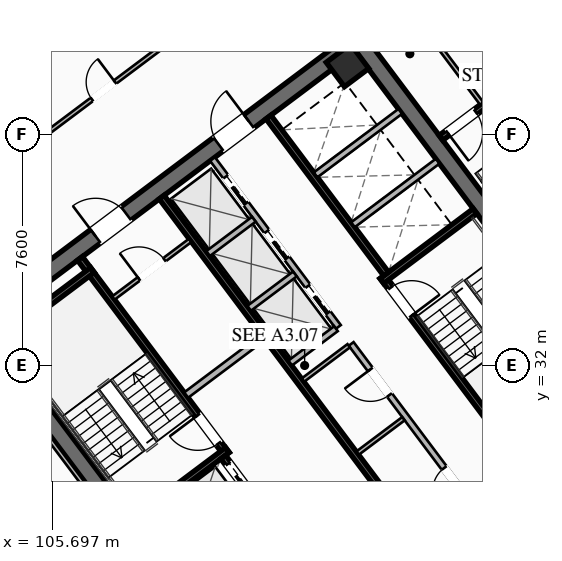
"""IFC4 building model, lengths in metres.
Left out: names, types, materials, properties, quantities, classifications, styles, units other than length and angle.
Written with IfcOpenShell. Run it as: python <this file> out.ifc"""

import sys

from ifc_helpers import new_model, si_unit, direction, frame, frame_2d, origin, origin_2d, place, context, subcontext, project, spatial, rectangle, hollow_rectangle, extrude, element, fill, save


model = new_model("IFC4")
c1 = context("Model", 3, precision=1e-05, world=origin(), true_north=direction((0.0, 1.0)))
c2 = subcontext(c1, "Body", "Model", "MODEL_VIEW")
j1 = project(units=[si_unit("LENGTHUNIT", "METRE"), si_unit("PLANEANGLEUNIT", "RADIAN")], contexts=[c1])
p1 = place(None, origin())
s1 = spatial("IfcSite", under=j1, at=p1, CompositionType="ELEMENT")
p2 = place(p1, origin())
s2 = spatial("IfcBuilding", under=s1, at=p2, CompositionType="ELEMENT")
p3 = place(p2, frame((0.0, 0.0, 164.1)))
s3 = spatial("IfcBuildingStorey", under=s2, at=p3, CompositionType="ELEMENT", Elevation=164.1)
for number, where, z_axis, x_axis in (
    (1, (112.436, 21.077, 0.0), (0.0, 0.0, 1.0), (-0.6, 0.8, 0.0)),
    (2, (115.564, 42.923, 0.0), (0.0, 0.0, 1.0), (0.6, -0.8, 0.0)),
):
    element("IfcWall", number, at=place(p3, frame(where, z_axis=z_axis, x_axis=x_axis)), inside=s3, PredefinedType="SHEAR", context=c2, shape_type="SweptSolid", body=[
        extrude(rectangle(XDim=15.6, YDim=0.55, at=frame_2d((7.8, 0.0))), origin(), (0.0, 0.0, 1.0), 3.55),
    ])
p4 = place(p3, frame((124.539, 30.498, 0.0), z_axis=(0.0, 0.0, 1.0), x_axis=(-0.799998054672, -0.600002593761, 0.0)))
e3 = element("IfcWall", 3, at=p4, inside=s3, PredefinedType="SHEAR", context=c2, shape_type="SweptSolid", body=[
    extrude(rectangle(XDim=15.06, YDim=0.55, at=frame_2d((7.53, 0.0))), origin(), (0.0, 0.0, 1.0), 3.55),
])
p5 = place(p4, frame((9.23, 0.0, 0.0)))
e4 = element("IfcOpeningElement", 4, at=p5, cuts=e3, PredefinedType="OPENING", context=c2, shape_type="SweptSolid", body=[
    extrude(rectangle(XDim=1.25, YDim=2.25, at=frame_2d((0.625, 1.125))), frame((0.0, 0.285, 0.0), z_axis=(0.0, -1.0, 0.0), x_axis=(1.0, 0.0, 0.0)), (0.0, 0.0, 1.0), 0.57),
])
p6 = place(p4, frame((4.18, 0.0, 0.0)))
e5 = element("IfcOpeningElement", 5, at=p6, cuts=e3, PredefinedType="OPENING", context=c2, shape_type="SweptSolid", body=[
    extrude(rectangle(XDim=1.25, YDim=2.25, at=frame_2d((0.625, 1.125))), frame((0.0, 0.285, 0.0), z_axis=(0.0, -1.0, 0.0), x_axis=(1.0, 0.0, 0.0)), (0.0, 0.0, 1.0), 0.57),
])
p7 = place(p3, frame((103.461, 33.502, 0.0), z_axis=(0.0, 0.0, 1.0), x_axis=(0.799998054672, 0.600002593761, 0.0)))
e6 = element("IfcWall", 6, at=p7, inside=s3, PredefinedType="SHEAR", context=c2, shape_type="SweptSolid", body=[
    extrude(rectangle(XDim=15.06, YDim=0.55, at=frame_2d((7.53, 0.0))), origin(), (0.0, 0.0, 1.0), 3.55),
])
p8 = place(p7, frame((4.58, 0.0, 0.0)))
e7 = element("IfcOpeningElement", 7, at=p8, cuts=e6, PredefinedType="OPENING", context=c2, shape_type="SweptSolid", body=[
    extrude(rectangle(XDim=1.25, YDim=2.25, at=frame_2d((0.625, 1.125))), frame((0.0, 0.285, 0.0), z_axis=(0.0, -1.0, 0.0), x_axis=(1.0, 0.0, 0.0)), (0.0, 0.0, 1.0), 0.57),
])
p9 = place(p7, frame((9.63, 0.0, 0.0)))
e8 = element("IfcOpeningElement", 8, at=p9, cuts=e6, PredefinedType="OPENING", context=c2, shape_type="SweptSolid", body=[
    extrude(rectangle(XDim=1.25, YDim=2.25, at=frame_2d((0.625, 1.125))), frame((0.0, 0.285, 0.0), z_axis=(0.0, -1.0, 0.0), x_axis=(1.0, 0.0, 0.0)), (0.0, 0.0, 1.0), 0.57),
])
p10 = place(p3, frame((115.41, 41.87, 0.0), z_axis=(0.0, 0.0, 1.0), x_axis=(0.799999996291, 0.600000004945, 0.0)))
e9 = element("IfcColumn", 9, at=p10, inside=s3, PredefinedType="COLUMN", context=c2, shape_type="SweptSolid", body=[
    extrude(hollow_rectangle(XDim=1.0, YDim=1.0, WallThickness=0.04, at=origin_2d()), origin(), (0.0, 0.0, 1.0), 3.37),
])
p11 = place(p3, frame((111.44, 29.08, 0.0), z_axis=(0.0, 0.0, 1.0), x_axis=(-0.59999029481, 0.8000072788, 0.0)))
e10 = element("IfcWall", 10, at=p11, inside=s3, PredefinedType="SHEAR", context=c2, shape_type="SweptSolid", body=[
    extrude(rectangle(XDim=8.05, YDim=0.2, at=frame_2d((4.025, 0.0))), origin(), (0.0, 0.0, 1.0), 3.37),
])
p12 = place(p11, frame((0.45, 0.0, 0.0)))
e11 = element("IfcOpeningElement", 11, at=p12, cuts=e10, PredefinedType="OPENING", context=c2, shape_type="SweptSolid", body=[
    extrude(rectangle(XDim=1.15, YDim=2.2, at=frame_2d((0.575, 1.1))), frame((0.0, 0.11, 0.0), z_axis=(0.0, -1.0, 0.0), x_axis=(1.0, 0.0, 0.0)), (0.0, 0.0, 1.0), 0.22),
])
for number, where, z_axis, x_axis in (
    (12, (108.396, 26.922, 0.0), (0.0, 0.0, 1.0), (0.8, 0.6, 0.0)),
    (13, (103.956, 32.842, 0.0), (0.0, 0.0, 1.0), (0.8, 0.6, 0.0)),
):
    element("IfcWall", number, at=place(p3, frame(where, z_axis=z_axis, x_axis=x_axis)), inside=s3, PredefinedType="SHEAR", context=c2, shape_type="SweptSolid", body=[
        extrude(rectangle(XDim=3.83, YDim=0.2, at=frame_2d((1.915, 0.0))), origin(), (0.0, 0.0, 1.0), 3.37),
    ])
p13 = place(p3, frame((116.56, 34.92, 0.0), z_axis=(0.0, 0.0, 1.0), x_axis=(0.59999029481, -0.8000072788, 0.0)))
e14 = element("IfcWall", 14, at=p13, inside=s3, PredefinedType="SHEAR", context=c2, shape_type="SweptSolid", body=[
    extrude(rectangle(XDim=8.05, YDim=0.2, at=frame_2d((4.025, 0.0))), origin(), (0.0, 0.0, 1.0), 3.37),
])
p14 = place(p13, frame((0.45, 0.0, 0.0)))
e15 = element("IfcOpeningElement", 15, at=p14, cuts=e14, PredefinedType="OPENING", context=c2, shape_type="SweptSolid", body=[
    extrude(rectangle(XDim=1.15, YDim=2.2, at=frame_2d((0.575, 1.1))), frame((0.0, 0.11, 0.0), z_axis=(0.0, -1.0, 0.0), x_axis=(1.0, 0.0, 0.0)), (0.0, 0.0, 1.0), 0.22),
])
p15 = place(p3, frame((116.54, 34.78, 0.0), z_axis=(0.0, 0.0, 1.0), x_axis=(0.800015298837, 0.599979601008, 0.0)))
e16 = element("IfcWall", 16, at=p15, inside=s3, PredefinedType="SHEAR", context=c2, shape_type="SweptSolid", body=[
    extrude(rectangle(XDim=3.83, YDim=0.2, at=frame_2d((1.915, 0.0))), origin(), (0.0, 0.0, 1.0), 3.37),
])
p16 = place(p3, frame((117.998, 25.936, 0.0), z_axis=(0.0, 0.0, 1.0), x_axis=(-0.600002693989, 0.799997979501, 0.0)))
e17 = element("IfcWall", 17, at=p16, inside=s3, PredefinedType="SHEAR", context=c2, shape_type="SweptSolid", body=[
    extrude(rectangle(XDim=14.5, YDim=0.2, at=frame_2d((7.25, 0.0))), origin(), (0.0, 0.0, 1.0), 3.37),
])
p17 = place(p3, frame((110.104, 31.028, 0.0), z_axis=(0.0, 0.0, 1.0), x_axis=(0.800018601094, 0.59997519774, 0.0)))
e18 = element("IfcWall", 18, at=p17, inside=s3, PredefinedType="SOLIDWALL", context=c2, shape_type="SweptSolid", body=[
    extrude(rectangle(XDim=3.15, YDim=0.22, at=frame_2d((1.575, 0.0))), origin(), (0.0, 0.0, 1.0), 2.723),
])
p18 = place(p3, frame((115.19, 23.83, 0.0), z_axis=(0.0, 0.0, 1.0), x_axis=(-0.599993943644, 0.800004542231, 0.0)))
e19 = element("IfcWall", 19, at=p18, inside=s3, PredefinedType="SHEAR", context=c2, shape_type="SweptSolid", body=[
    extrude(rectangle(XDim=6.45, YDim=0.2, at=frame_2d((3.225, 0.0))), origin(), (0.0, 0.0, 1.0), 3.37),
])
p19 = place(p18, frame((4.875, 0.0, 0.0)))
e20 = element("IfcOpeningElement", 20, at=p19, cuts=e19, PredefinedType="OPENING", context=c2, shape_type="SweptSolid", body=[
    extrude(rectangle(XDim=1.3, YDim=2.25, at=frame_2d((0.65, 1.125))), frame((0.0, 0.11, 0.0), z_axis=(0.0, -1.0, 0.0), x_axis=(1.0, 0.0, 0.0)), (0.0, 0.0, 1.0), 0.22),
])
p20 = place(p18, frame((2.875, 0.0, 0.0)))
e21 = element("IfcOpeningElement", 21, at=p20, cuts=e19, PredefinedType="OPENING", context=c2, shape_type="SweptSolid", body=[
    extrude(rectangle(XDim=1.3, YDim=2.25, at=frame_2d((0.65, 1.125))), frame((0.0, 0.11, 0.0), z_axis=(0.0, -1.0, 0.0), x_axis=(1.0, 0.0, 0.0)), (0.0, 0.0, 1.0), 0.22),
])
p21 = place(p18, frame((0.675, 0.0, 0.0)))
e22 = element("IfcOpeningElement", 22, at=p21, cuts=e19, PredefinedType="OPENING", context=c2, shape_type="SweptSolid", body=[
    extrude(rectangle(XDim=1.3, YDim=2.25, at=frame_2d((0.65, 1.125))), frame((0.0, 0.11, 0.0), z_axis=(0.0, -1.0, 0.0), x_axis=(1.0, 0.0, 0.0)), (0.0, 0.0, 1.0), 0.22),
])
p22 = place(p3, frame((112.81, 40.17, 0.0), z_axis=(0.0, 0.0, 1.0), x_axis=(0.599993943644, -0.800004542231, 0.0)))
e23 = element("IfcWall", 23, at=p22, inside=s3, PredefinedType="SHEAR", context=c2, shape_type="SweptSolid", body=[
    extrude(rectangle(XDim=6.45, YDim=0.2, at=frame_2d((3.225, 0.0))), origin(), (0.0, 0.0, 1.0), 3.37),
])
for number, where, z_axis, x_axis in (
    (24, (115.59, 36.63, 0.0), (0.0, 0.0, 1.0), (0.8, 0.6, 0.0)),
    (25, (114.36, 38.27, 0.0), (0.0, 0.0, 1.0), (0.8, 0.6, 0.0)),
):
    element("IfcWall", number, at=place(p3, frame(where, z_axis=z_axis, x_axis=x_axis)), inside=s3, PredefinedType="SOLIDWALL", context=c2, shape_type="SweptSolid", body=[
        extrude(rectangle(XDim=3.48, YDim=0.2, at=frame_2d((1.74, 0.0))), origin(), (0.0, 0.0, 1.0), 3.37),
    ])
p23 = place(p3, frame((107.71, 34.22, 0.0), z_axis=(0.0, 0.0, 1.0), x_axis=(0.799981399002, 0.60002480053, 0.0)))
e26 = element("IfcWall", 26, at=p23, inside=s3, PredefinedType="PARTITIONING", context=c2, shape_type="SweptSolid", body=[
    extrude(rectangle(XDim=3.15, YDim=0.135, at=frame_2d((1.575, 0.0))), origin(), (0.0, 0.0, 1.0), 2.723),
])
p24 = place(p23, frame((1.05, 0.0, 0.0)))
e27 = element("IfcOpeningElement", 27, at=p24, cuts=e26, PredefinedType="OPENING", context=c2, shape_type="SweptSolid", body=[
    extrude(rectangle(XDim=1.05, YDim=2.2, at=frame_2d((0.525, 1.1))), frame((0.0, 0.077, 0.0), z_axis=(0.0, -1.0, 0.0), x_axis=(1.0, 0.0, 0.0)), (0.0, 0.0, 1.0), 0.155),
])
p25 = place(p3, frame((119.67, 27.19, 0.0), z_axis=(0.0, 0.0, 1.0), x_axis=(-0.599988677396, 0.800008491828, 0.0)))
e28 = element("IfcWall", 28, at=p25, inside=s3, PredefinedType="SOLIDWALL", context=c2, shape_type="SweptSolid", body=[
    extrude(rectangle(XDim=6.9, YDim=0.2, at=frame_2d((3.45, 0.0))), origin(), (0.0, 0.0, 1.0), 2.723),
])
p26 = place(p25, frame((0.85, 0.0, 0.0)))
e29 = element("IfcOpeningElement", 29, at=p26, cuts=e28, PredefinedType="OPENING", context=c2, shape_type="SweptSolid", body=[
    extrude(rectangle(XDim=0.95, YDim=2.05, at=frame_2d((0.475, 1.025))), frame((0.0, 0.11, 0.0), z_axis=(0.0, -1.0, 0.0), x_axis=(1.0, 0.0, 0.0)), (0.0, 0.0, 1.0), 0.22),
])
p27 = place(p25, frame((4.8, 0.0, 0.0)))
e30 = element("IfcOpeningElement", 30, at=p27, cuts=e28, PredefinedType="OPENING", context=c2, shape_type="SweptSolid", body=[
    extrude(rectangle(XDim=1.05, YDim=2.2, at=frame_2d((0.525, 1.1))), frame((0.0, 0.11, 0.0), z_axis=(0.0, -1.0, 0.0), x_axis=(1.0, 0.0, 0.0)), (0.0, 0.0, 1.0), 0.22),
])
for number, where, z_axis, x_axis in (
    (31, (113.946, 31.522, 0.0), (0.0, 0.0, 1.0), (0.8, 0.6, 0.0)),
    (32, (115.746, 29.122, 0.0), (0.0, 0.0, 1.0), (0.8, 0.6, 0.0)),
):
    element("IfcWall", number, at=place(p3, frame(where, z_axis=z_axis, x_axis=x_axis)), inside=s3, PredefinedType="PARTITIONING", context=c2, shape_type="SweptSolid", body=[
        extrude(rectangle(XDim=1.88, YDim=0.135, at=frame_2d((0.94, 0.0))), origin(), (0.0, 0.0, 1.0), 2.723),
    ])
p28 = place(p3, frame((115.11, 33.27, 0.0), z_axis=(0.0, 0.0, 1.0), x_axis=(-0.600011322243, 0.799991508192, 0.0)))
e33 = element("IfcWall", 33, at=p28, inside=s3, PredefinedType="SOLIDWALL", context=c2, shape_type="SweptSolid", body=[
    extrude(rectangle(XDim=6.9, YDim=0.2, at=frame_2d((3.45, 0.0))), origin(), (0.0, 0.0, 1.0), 3.37),
])
p29 = place(p28, frame((0.575, 0.0, 0.0)))
e34 = element("IfcOpeningElement", 34, at=p29, cuts=e33, PredefinedType="OPENING", context=c2, shape_type="SweptSolid", body=[
    extrude(rectangle(XDim=1.1, YDim=2.2, at=frame_2d((0.55, 1.1))), frame((0.0, 0.11, 0.0), z_axis=(0.0, -1.0, 0.0), x_axis=(1.0, 0.0, 0.0)), (0.0, 0.0, 1.0), 0.22),
])
p30 = place(p28, frame((2.825, 0.0, 0.0)))
e35 = element("IfcOpeningElement", 35, at=p30, cuts=e33, PredefinedType="OPENING", context=c2, shape_type="SweptSolid", body=[
    extrude(rectangle(XDim=1.1, YDim=2.2, at=frame_2d((0.55, 1.1))), frame((0.0, 0.11, 0.0), z_axis=(0.0, -1.0, 0.0), x_axis=(1.0, 0.0, 0.0)), (0.0, 0.0, 1.0), 0.22),
])
p31 = place(p28, frame((5.075, 0.0, 0.0)))
e36 = element("IfcOpeningElement", 36, at=p31, cuts=e33, PredefinedType="OPENING", context=c2, shape_type="SweptSolid", body=[
    extrude(rectangle(XDim=1.1, YDim=2.2, at=frame_2d((0.55, 1.1))), frame((0.0, 0.11, 0.0), z_axis=(0.0, -1.0, 0.0), x_axis=(1.0, 0.0, 0.0)), (0.0, 0.0, 1.0), 0.22),
])
p32 = place(p3, frame((113.526, 32.082, 0.0), z_axis=(0.0, 0.0, 1.0), x_axis=(0.800046745961, 0.599937666993, 0.0)))
e37 = element("IfcWall", 37, at=p32, inside=s3, PredefinedType="SOLIDWALL", context=c2, shape_type="SweptSolid", body=[
    extrude(rectangle(XDim=1.88, YDim=0.2, at=frame_2d((0.94, 0.0))), origin(), (0.0, 0.0, 1.0), 3.37),
])
p33 = place(p3, frame((112.176, 33.882, 0.0), z_axis=(0.0, 0.0, 1.0), x_axis=(0.8, 0.6, 0.0)))
e38 = element("IfcWall", 38, at=p33, inside=s3, PredefinedType="SOLIDWALL", context=c2, shape_type="SweptSolid", body=[
    extrude(rectangle(XDim=1.88, YDim=0.2, at=frame_2d((0.94, 0.0))), origin(), (0.0, 0.0, 1.0), 3.37),
])
p34 = place(p3, frame((110.826, 35.682, 0.0), z_axis=(0.0, 0.0, 1.0), x_axis=(0.799984418148, 0.600020775241, 0.0)))
e39 = element("IfcWall", 39, at=p34, inside=s3, PredefinedType="SOLIDWALL", context=c2, shape_type="SweptSolid", body=[
    extrude(rectangle(XDim=1.88, YDim=0.2, at=frame_2d((0.94, 0.0))), origin(), (0.0, 0.0, 1.0), 3.37),
])
p35 = place(p3, frame((121.204, 41.528, 0.0), z_axis=(0.0, 0.0, 1.0), x_axis=(-0.800017232136, -0.599977023131, 0.0)))
e40 = element("IfcWall", 40, at=p35, inside=s3, PredefinedType="SHEAR", context=c2, shape_type="SweptSolid", body=[
    extrude(rectangle(XDim=3.4, YDim=0.2, at=frame_2d((1.7, 0.0))), origin(), (0.0, 0.0, 1.0), 3.37),
])
p36 = place(p35, frame((1.975, 0.0, 0.0)))
e41 = element("IfcOpeningElement", 41, at=p36, cuts=e40, PredefinedType="OPENING", context=c2, shape_type="SweptSolid", body=[
    extrude(rectangle(XDim=1.15, YDim=2.2, at=frame_2d((0.575, 1.1))), frame((0.0, 0.11, 0.0), z_axis=(0.0, -1.0, 0.0), x_axis=(1.0, 0.0, 0.0)), (0.0, 0.0, 1.0), 0.22),
])
p37 = place(p3, frame((119.824, 40.618, 0.0), z_axis=(0.0, 0.0, 1.0), x_axis=(-0.599982243973, 0.800013316712, 0.0)))
e42 = element("IfcWall", 42, at=p37, inside=s3, PredefinedType="PARTITIONING", context=c2, shape_type="SweptSolid", body=[
    extrude(rectangle(XDim=4.4, YDim=0.135, at=frame_2d((2.2, 0.0))), origin(), (0.0, 0.0, 1.0), 2.723),
])
p38 = place(p3, frame((95.8, 32.35, 0.0), z_axis=(0.0, 0.0, 1.0), x_axis=(0.8, 0.6, 0.0)))
e43 = element("IfcWall", 43, at=p38, inside=s3, PredefinedType="PARTITIONING", context=c2, shape_type="SweptSolid", body=[
    extrude(rectangle(XDim=28.7, YDim=0.135, at=frame_2d((14.35, 0.0))), origin(), (0.0, 0.0, 1.0), 2.723),
])
p39 = place(p38, frame((0.3, 0.0, 0.0)))
e44 = element("IfcOpeningElement", 44, at=p39, cuts=e43, PredefinedType="OPENING", context=c2, shape_type="SweptSolid", body=[
    extrude(rectangle(XDim=0.95, YDim=2.05, at=frame_2d((0.475, 1.025))), frame((0.0, 0.077, 0.0), z_axis=(0.0, -1.0, 0.0), x_axis=(1.0, 0.0, 0.0)), (0.0, 0.0, 1.0), 0.155),
])
p40 = place(p38, frame((9.959, 0.0, 0.0)))
e45 = element("IfcOpeningElement", 45, at=p40, cuts=e43, PredefinedType="OPENING", context=c2, shape_type="SweptSolid", body=[
    extrude(rectangle(XDim=0.95, YDim=2.05, at=frame_2d((0.475, 1.025))), frame((0.0, 0.077, 0.0), z_axis=(0.0, -1.0, 0.0), x_axis=(1.0, 0.0, 0.0)), (0.0, 0.0, 1.0), 0.155),
])
p41 = place(p38, frame((14.005, 0.0, 0.0)))
e46 = element("IfcOpeningElement", 46, at=p41, cuts=e43, PredefinedType="OPENING", context=c2, shape_type="SweptSolid", body=[
    extrude(rectangle(XDim=0.95, YDim=2.05, at=frame_2d((0.475, 1.025))), frame((0.0, 0.077, 0.0), z_axis=(0.0, -1.0, 0.0), x_axis=(1.0, 0.0, 0.0)), (0.0, 0.0, 1.0), 0.155),
])
p42 = place(p38, frame((18.049, 0.0, 0.0)))
e47 = element("IfcOpeningElement", 47, at=p42, cuts=e43, PredefinedType="OPENING", context=c2, shape_type="SweptSolid", body=[
    extrude(rectangle(XDim=0.95, YDim=2.05, at=frame_2d((0.475, 1.025))), frame((0.0, 0.077, 0.0), z_axis=(0.0, -1.0, 0.0), x_axis=(1.0, 0.0, 0.0)), (0.0, 0.0, 1.0), 0.155),
])
p43 = place(p38, frame((27.45, 0.0, 0.0)))
e48 = element("IfcOpeningElement", 48, at=p43, cuts=e43, PredefinedType="OPENING", context=c2, shape_type="SweptSolid", body=[
    extrude(rectangle(XDim=0.95, YDim=2.05, at=frame_2d((0.475, 1.025))), frame((0.0, 0.077, 0.0), z_axis=(0.0, -1.0, 0.0), x_axis=(1.0, 0.0, 0.0)), (0.0, 0.0, 1.0), 0.155),
])
p44 = place(p3, frame((131.282, 32.874, 0.0), z_axis=(0.0, 0.0, 1.0), x_axis=(-0.8, -0.6, 0.0)))
e49 = element("IfcWall", 49, at=p44, inside=s3, PredefinedType="PARTITIONING", context=c2, shape_type="SweptSolid", body=[
    extrude(rectangle(XDim=28.7, YDim=0.135, at=frame_2d((14.35, 0.0))), origin(), (0.0, 0.0, 1.0), 2.723),
])
p45 = place(p44, frame((27.37, 0.0, 0.0)))
e50 = element("IfcOpeningElement", 50, at=p45, cuts=e49, PredefinedType="OPENING", context=c2, shape_type="SweptSolid", body=[
    extrude(rectangle(XDim=0.95, YDim=2.05, at=frame_2d((0.475, 1.025))), frame((0.0, 0.077, 0.0), z_axis=(0.0, -1.0, 0.0), x_axis=(1.0, 0.0, 0.0)), (0.0, 0.0, 1.0), 0.155),
])
p46 = place(p44, frame((13.592, 0.0, 0.0)))
e51 = element("IfcOpeningElement", 51, at=p46, cuts=e49, PredefinedType="OPENING", context=c2, shape_type="SweptSolid", body=[
    extrude(rectangle(XDim=0.95, YDim=2.05, at=frame_2d((0.475, 1.025))), frame((0.0, 0.077, 0.0), z_axis=(0.0, -1.0, 0.0), x_axis=(1.0, 0.0, 0.0)), (0.0, 0.0, 1.0), 0.155),
])
p47 = place(p44, frame((0.38, 0.0, 0.0)))
e52 = element("IfcOpeningElement", 52, at=p47, cuts=e49, PredefinedType="OPENING", context=c2, shape_type="SweptSolid", body=[
    extrude(rectangle(XDim=0.95, YDim=2.05, at=frame_2d((0.475, 1.025))), frame((0.0, 0.077, 0.0), z_axis=(0.0, -1.0, 0.0), x_axis=(1.0, 0.0, 0.0)), (0.0, 0.0, 1.0), 0.155),
])
p48 = place(p3, frame((112.104, 20.928, 0.0), z_axis=(0.0, 0.0, 1.0), x_axis=(-0.599994940075, 0.800003794918, 0.0)))
e53 = element("IfcWall", 53, at=p48, inside=s3, PredefinedType="PARTITIONING", context=c2, shape_type="SweptSolid", body=[
    extrude(rectangle(XDim=15.44, YDim=0.135, at=frame_2d((7.72, 0.0))), origin(), (0.0, 0.0, 1.0), 2.723),
])
p49 = place(p8, origin())
e54 = element("IfcDoor", 54, at=p49, inside=s3, OperationType="SINGLE_SWING_LEFT", PredefinedType="DOOR", context=c2, shape_type="SweptSolid", body=[
    extrude(rectangle(XDim=1.25, YDim=2.25, at=frame_2d((0.625, 1.125))), frame((0.0, 0.025, 0.0), z_axis=(0.0, -1.0, 0.0), x_axis=(1.0, 0.0, 0.0)), (0.0, 0.0, 1.0), 0.05),
])
fill(e7, e54)
p50 = place(p9, origin())
e55 = element("IfcDoor", 55, at=p50, inside=s3, OperationType="SINGLE_SWING_RIGHT", PredefinedType="DOOR", context=c2, shape_type="SweptSolid", body=[
    extrude(rectangle(XDim=1.25, YDim=2.25, at=frame_2d((0.625, 1.125))), frame((0.0, 0.025, 0.0), z_axis=(0.0, -1.0, 0.0), x_axis=(1.0, 0.0, 0.0)), (0.0, 0.0, 1.0), 0.05),
])
fill(e8, e55)
p51 = place(p12, origin())
e56 = element("IfcDoor", 56, at=p51, inside=s3, OperationType="SINGLE_SWING_RIGHT", PredefinedType="DOOR", context=c2, shape_type="SweptSolid", body=[
    extrude(rectangle(XDim=1.15, YDim=2.2, at=frame_2d((0.575, 1.1))), frame((0.0, 0.025, 0.0), z_axis=(0.0, -1.0, 0.0), x_axis=(1.0, 0.0, 0.0)), (0.0, 0.0, 1.0), 0.05),
])
fill(e11, e56)
p52 = place(p14, origin())
e57 = element("IfcDoor", 57, at=p52, inside=s3, OperationType="SINGLE_SWING_RIGHT", PredefinedType="DOOR", context=c2, shape_type="SweptSolid", body=[
    extrude(rectangle(XDim=1.15, YDim=2.2, at=frame_2d((0.575, 1.1))), frame((0.0, 0.025, 0.0), z_axis=(0.0, -1.0, 0.0), x_axis=(1.0, 0.0, 0.0)), (0.0, 0.0, 1.0), 0.05),
])
fill(e15, e57)
p53 = place(p24, origin())
e58 = element("IfcDoor", 58, at=p53, inside=s3, OperationType="SINGLE_SWING_LEFT", PredefinedType="DOOR", context=c2, shape_type="SweptSolid", body=[
    extrude(rectangle(XDim=1.05, YDim=2.2, at=frame_2d((0.525, 1.1))), frame((0.0, 0.025, 0.0), z_axis=(0.0, -1.0, 0.0), x_axis=(1.0, 0.0, 0.0)), (0.0, 0.0, 1.0), 0.05),
])
fill(e27, e58)
p54 = place(p26, origin())
e59 = element("IfcDoor", 59, at=p54, inside=s3, OperationType="SINGLE_SWING_LEFT", PredefinedType="DOOR", context=c2, shape_type="SweptSolid", body=[
    extrude(rectangle(XDim=0.95, YDim=2.05, at=frame_2d((0.475, 1.025))), frame((0.0, 0.025, 0.0), z_axis=(0.0, -1.0, 0.0), x_axis=(1.0, 0.0, 0.0)), (0.0, 0.0, 1.0), 0.05),
])
fill(e29, e59)
p55 = place(p27, origin())
e60 = element("IfcDoor", 60, at=p55, inside=s3, OperationType="SINGLE_SWING_RIGHT", PredefinedType="DOOR", context=c2, shape_type="SweptSolid", body=[
    extrude(rectangle(XDim=1.05, YDim=2.2, at=frame_2d((0.525, 1.1))), frame((0.0, 0.025, 0.0), z_axis=(0.0, -1.0, 0.0), x_axis=(1.0, 0.0, 0.0)), (0.0, 0.0, 1.0), 0.05),
])
fill(e30, e60)
p56 = place(p36, origin())
e61 = element("IfcDoor", 61, at=p56, inside=s3, OperationType="SINGLE_SWING_RIGHT", PredefinedType="DOOR", context=c2, shape_type="SweptSolid", body=[
    extrude(rectangle(XDim=1.15, YDim=2.2, at=frame_2d((0.575, 1.1))), frame((0.0, 0.025, 0.0), z_axis=(0.0, -1.0, 0.0), x_axis=(1.0, 0.0, 0.0)), (0.0, 0.0, 1.0), 0.05),
])
fill(e41, e61)
p57 = place(p41, origin())
e62 = element("IfcDoor", 62, at=p57, inside=s3, OperationType="SINGLE_SWING_RIGHT", PredefinedType="DOOR", context=c2, shape_type="SweptSolid", body=[
    extrude(rectangle(XDim=0.95, YDim=2.05, at=frame_2d((0.475, 1.025))), frame((0.0, 0.025, 0.0), z_axis=(0.0, -1.0, 0.0), x_axis=(1.0, 0.0, 0.0)), (0.0, 0.0, 1.0), 0.05),
])
fill(e46, e62)
p58 = place(p19, origin())
e63 = element("IfcDoor", 63, at=p58, inside=s3, OperationType="SLIDING_TO_LEFT", PredefinedType="DOOR", context=c2, shape_type="SweptSolid", body=[
    extrude(rectangle(XDim=1.3, YDim=2.25, at=frame_2d((0.65, 1.125))), frame((0.0, 0.025, 0.0), z_axis=(0.0, -1.0, 0.0), x_axis=(1.0, 0.0, 0.0)), (0.0, 0.0, 1.0), 0.05),
])
fill(e20, e63)
p59 = place(p29, origin())
e64 = element("IfcDoor", 64, at=p59, inside=s3, OperationType="SLIDING_TO_LEFT", PredefinedType="DOOR", context=c2, shape_type="SweptSolid", body=[
    extrude(rectangle(XDim=1.1, YDim=2.2, at=frame_2d((0.55, 1.1))), frame((0.0, 0.025, 0.0), z_axis=(0.0, -1.0, 0.0), x_axis=(1.0, 0.0, 0.0)), (0.0, 0.0, 1.0), 0.05),
])
fill(e34, e64)
p60 = place(p30, origin())
e65 = element("IfcDoor", 65, at=p60, inside=s3, OperationType="SLIDING_TO_LEFT", PredefinedType="DOOR", context=c2, shape_type="SweptSolid", body=[
    extrude(rectangle(XDim=1.1, YDim=2.2, at=frame_2d((0.55, 1.1))), frame((0.0, 0.025, 0.0), z_axis=(0.0, -1.0, 0.0), x_axis=(1.0, 0.0, 0.0)), (0.0, 0.0, 1.0), 0.05),
])
fill(e35, e65)
p61 = place(p31, origin())
e66 = element("IfcDoor", 66, at=p61, inside=s3, OperationType="SLIDING_TO_LEFT", PredefinedType="DOOR", context=c2, shape_type="SweptSolid", body=[
    extrude(rectangle(XDim=1.1, YDim=2.2, at=frame_2d((0.55, 1.1))), frame((0.0, 0.025, 0.0), z_axis=(0.0, -1.0, 0.0), x_axis=(1.0, 0.0, 0.0)), (0.0, 0.0, 1.0), 0.05),
])
fill(e36, e66)
save(model, sys.argv[1])
